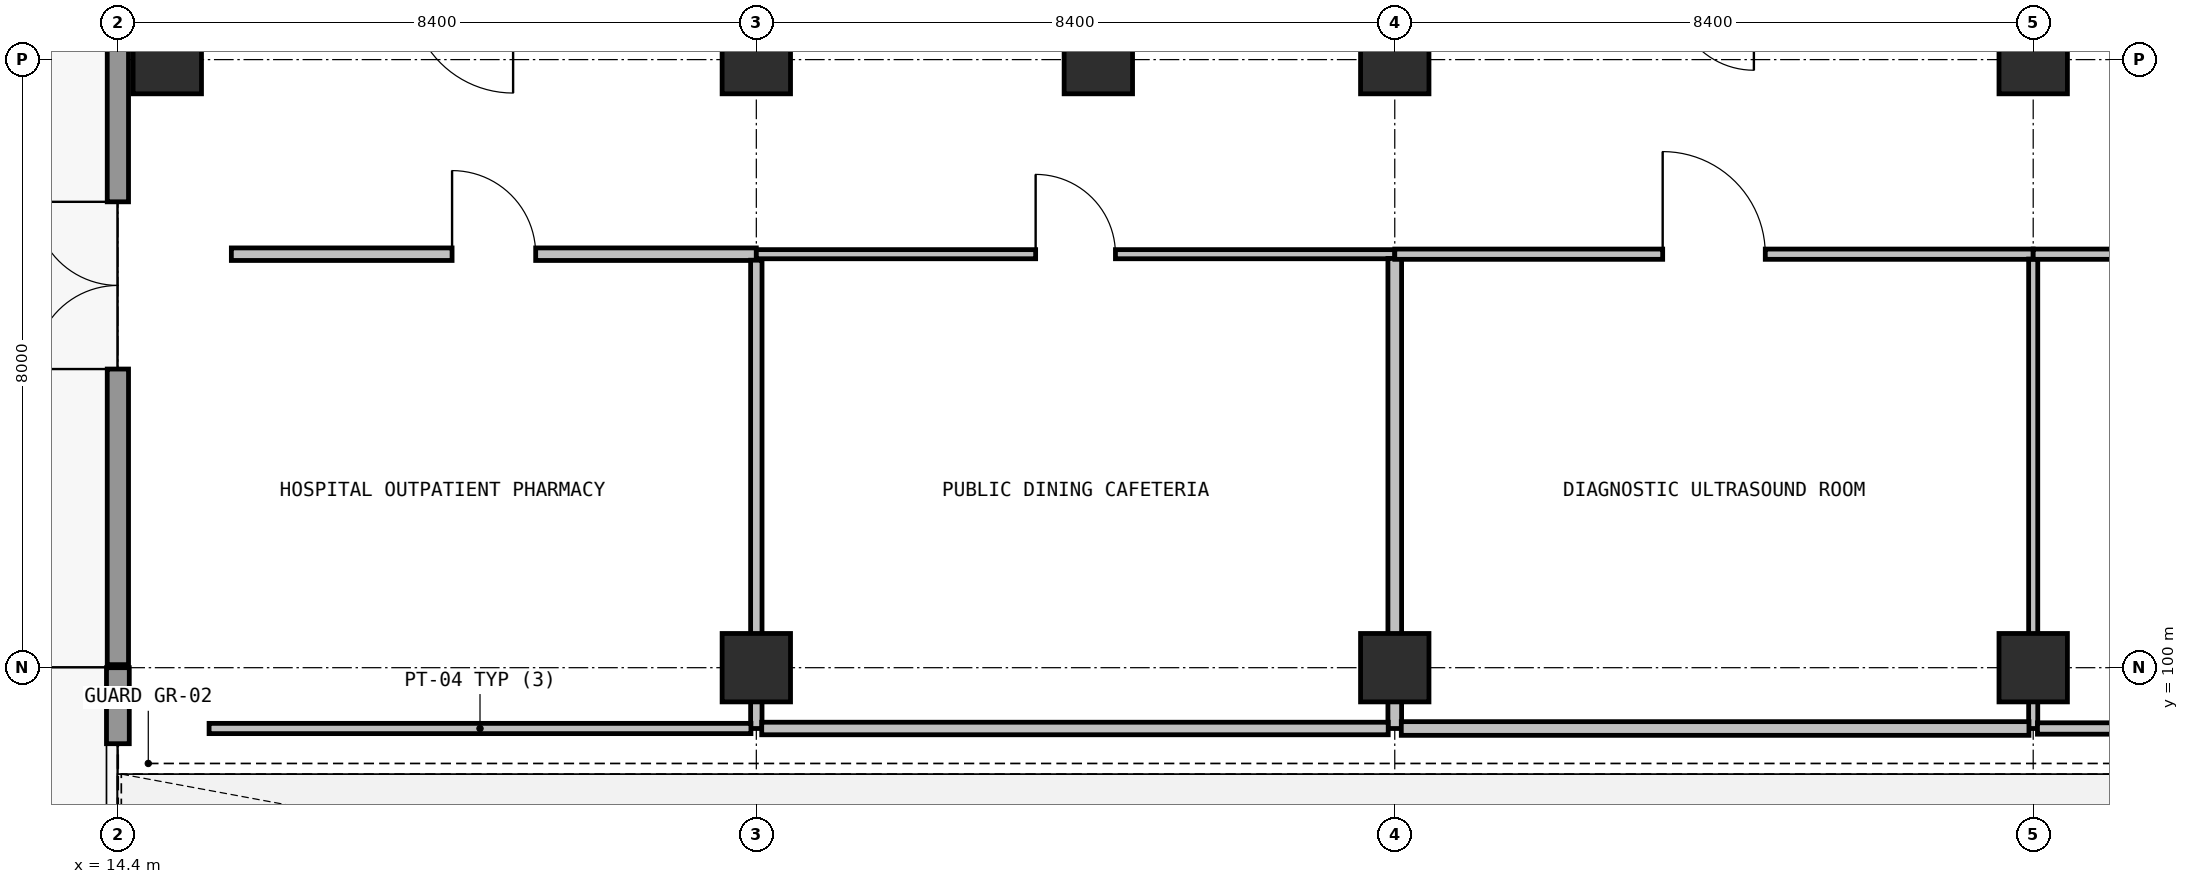
"""IFC4 building model, lengths in metres.
Left out: names, types, materials, properties, quantities, classifications, styles, units other than length and angle.
Written with IfcOpenShell. Run it as: python <this file> out.ifc"""

import sys

from ifc_helpers import new_model, si_unit, direction, frame, frame_2d, origin, origin_2d, place, context, subcontext, project, spatial, rectangle, extrude, element, fill, save


model = new_model("IFC4")
c1 = context("Model", 3, precision=1e-05, world=origin(), true_north=direction((0.0, 1.0)))
c2 = subcontext(c1, "Body", "Model", "MODEL_VIEW")
j1 = project(units=[si_unit("LENGTHUNIT", "METRE"), si_unit("PLANEANGLEUNIT", "RADIAN")], contexts=[c1])
p1 = place(None, origin())
s1 = spatial("IfcSite", under=j1, at=p1, CompositionType="ELEMENT")
p2 = place(p1, origin())
s2 = spatial("IfcBuilding", under=s1, at=p2, CompositionType="ELEMENT")
p3 = place(p2, origin())
s3 = spatial("IfcBuildingStorey", under=s2, at=p3, CompositionType="ELEMENT", Elevation=0.0)
for number, where, z_axis, x_axis in (
    (1, (27.3, 108.0, 0.0), (0.0, 0.0, 1.0), (1.0, 0.0, 0.0)),
    (2, (15.05, 108.0, 0.0), (0.0, 0.0, 1.0), (1.0, 0.0, 0.0)),
    (3, (22.8, 100.0, 0.0), (0.0, 0.0, 1.0), (1.0, 0.0, 0.0)),
    (4, (22.8, 108.0, 0.0), (0.0, 0.0, 1.0), (1.0, 0.0, 0.0)),
    (5, (31.2, 100.0, 0.0), (0.0, 0.0, 1.0), (1.0, 0.0, 0.0)),
    (6, (31.2, 108.0, 0.0), (0.0, 0.0, 1.0), (1.0, 0.0, 0.0)),
    (7, (39.6, 100.0, 0.0), (0.0, 0.0, 1.0), (1.0, 0.0, 0.0)),
    (8, (39.6, 108.0, 0.0), (0.0, 0.0, 1.0), (1.0, 0.0, 0.0)),
):
    element("IfcColumn", number, at=place(p3, frame(where, z_axis=z_axis, x_axis=x_axis)), inside=s3, PredefinedType="COLUMN", context=c2, shape_type="SweptSolid", body=[
        extrude(rectangle(XDim=0.9, YDim=0.9, at=origin_2d()), origin(), (0.0, 0.0, 1.0), 5.4),
    ])
p4 = place(p3, frame((14.4, 100.04, 0.0), z_axis=(0.0, 0.0, 1.0), x_axis=(0.0, 1.0, 0.0)))
e9 = element("IfcWall", 9, at=p4, inside=s3, PredefinedType="SOLIDWALL", context=c2, shape_type="SweptSolid", body=[
    extrude(rectangle(XDim=9.979, YDim=0.28, at=frame_2d((4.99, 0.0))), origin(), (0.0, 0.0, 1.0), 5.08),
])
p5 = place(p4, frame((3.889, 0.0, 0.0)))
e10 = element("IfcOpeningElement", 10, at=p5, cuts=e9, PredefinedType="OPENING", context=c2, shape_type="SweptSolid", body=[
    extrude(rectangle(XDim=2.2, YDim=2.35, at=frame_2d((1.1, 1.175))), frame((0.0, 0.15, 0.0), z_axis=(0.0, -1.0, 0.0), x_axis=(1.0, 0.0, 0.0)), (0.0, 0.0, 1.0), 0.3),
])
p6 = place(p3, frame((14.4, 92.0, 0.0), z_axis=(0.0, 0.0, 1.0), x_axis=(0.0, 1.0, 0.0)))
e11 = element("IfcWall", 11, at=p6, inside=s3, PredefinedType="SOLIDWALL", context=c2, shape_type="SweptSolid", body=[
    extrude(rectangle(XDim=8.0, YDim=0.3, at=frame_2d((4.0, 0.0))), origin(), (0.0, 0.0, 1.0), 5.08),
])
p7 = place(p6, frame((1.0, 0.0, 0.0)))
e12 = element("IfcOpeningElement", 12, at=p7, cuts=e11, PredefinedType="OPENING", context=c2, shape_type="SweptSolid", body=[
    extrude(rectangle(XDim=6.0, YDim=3.2, at=frame_2d((3.0, 1.6))), frame((0.0, 0.16, 0.0), z_axis=(0.0, -1.0, 0.0), x_axis=(1.0, 0.0, 0.0)), (0.0, 0.0, 1.0), 0.32),
])
p8 = place(p3, frame((15.893, 105.44, 0.0), z_axis=(0.0, 0.0, 1.0), x_axis=(1.0, 0.0, 0.0)))
e13 = element("IfcWall", 13, at=p8, inside=s3, PredefinedType="PARTITIONING", context=c2, shape_type="SweptSolid", body=[
    extrude(rectangle(XDim=6.907, YDim=0.165, at=frame_2d((3.454, 0.0))), origin(), (0.0, 0.0, 1.0), 5.08),
])
p9 = place(p8, frame((2.904, 0.0, 0.0)))
e14 = element("IfcOpeningElement", 14, at=p9, cuts=e13, PredefinedType="OPENING", context=c2, shape_type="SweptSolid", body=[
    extrude(rectangle(XDim=1.1, YDim=2.15, at=frame_2d((0.55, 1.075))), frame((0.0, 0.093, 0.0), z_axis=(0.0, -1.0, 0.0), x_axis=(1.0, 0.0, 0.0)), (0.0, 0.0, 1.0), 0.185),
])
p10 = place(p3, frame((22.8, 105.361, 0.0), z_axis=(0.0, 0.0, 1.0), x_axis=(0.0, -1.0, 0.0)))
e15 = element("IfcWall", 15, at=p10, inside=s3, PredefinedType="PARTITIONING", context=c2, shape_type="SweptSolid", body=[
    extrude(rectangle(XDim=6.161, YDim=0.15, at=frame_2d((3.081, 0.0))), origin(), (0.0, 0.0, 1.0), 4.33),
])
p11 = place(p3, frame((22.729, 99.2, 0.0), z_axis=(0.0, 0.0, 1.0), x_axis=(-1.0, 0.0, 0.0)))
e16 = element("IfcWall", 16, at=p11, inside=s3, PredefinedType="PARTITIONING", context=c2, shape_type="SweptSolid", body=[
    extrude(rectangle(XDim=7.129, YDim=0.135, at=frame_2d((3.564, 0.0))), origin(), (0.0, 0.0, 1.0), 5.08),
])
p12 = place(p3, frame((22.8, 105.44, 0.0), z_axis=(0.0, 0.0, 1.0), x_axis=(1.0, 0.0, 0.0)))
e17 = element("IfcWall", 17, at=p12, inside=s3, PredefinedType="PARTITIONING", context=c2, shape_type="SweptSolid", body=[
    extrude(rectangle(XDim=8.4, YDim=0.12, at=frame_2d((4.2, 0.0))), origin(), (0.0, 0.0, 1.0), 5.08),
])
p13 = place(p12, frame((3.675, 0.0, 0.0)))
e18 = element("IfcOpeningElement", 18, at=p13, cuts=e17, PredefinedType="OPENING", context=c2, shape_type="SweptSolid", body=[
    extrude(rectangle(XDim=1.05, YDim=2.15, at=frame_2d((0.525, 1.075))), frame((0.0, 0.07, 0.0), z_axis=(0.0, -1.0, 0.0), x_axis=(1.0, 0.0, 0.0)), (0.0, 0.0, 1.0), 0.14),
])
p14 = place(p3, frame((31.2, 105.384, 0.0), z_axis=(0.0, 0.0, 1.0), x_axis=(0.0, -1.0, 0.0)))
e19 = element("IfcWall", 19, at=p14, inside=s3, PredefinedType="PARTITIONING", context=c2, shape_type="SweptSolid", body=[
    extrude(rectangle(XDim=6.184, YDim=0.18, at=frame_2d((3.092, 0.0))), origin(), (0.0, 0.0, 1.0), 4.33),
])
p15 = place(p3, frame((31.114, 99.2, 0.0), z_axis=(0.0, 0.0, 1.0), x_axis=(-1.0, 0.0, 0.0)))
e20 = element("IfcWall", 20, at=p15, inside=s3, PredefinedType="PARTITIONING", context=c2, shape_type="SweptSolid", body=[
    extrude(rectangle(XDim=8.243, YDim=0.165, at=frame_2d((4.122, 0.0))), origin(), (0.0, 0.0, 1.0), 5.08),
])
p16 = place(p3, frame((31.2, 105.44, 0.0), z_axis=(0.0, 0.0, 1.0), x_axis=(1.0, 0.0, 0.0)))
e21 = element("IfcWall", 21, at=p16, inside=s3, PredefinedType="PARTITIONING", context=c2, shape_type="SweptSolid", body=[
    extrude(rectangle(XDim=8.4, YDim=0.135, at=frame_2d((4.2, 0.0))), origin(), (0.0, 0.0, 1.0), 5.08),
])
p17 = place(p16, frame((3.525, 0.0, 0.0)))
e22 = element("IfcOpeningElement", 22, at=p17, cuts=e21, PredefinedType="OPENING", context=c2, shape_type="SweptSolid", body=[
    extrude(rectangle(XDim=1.35, YDim=2.15, at=frame_2d((0.675, 1.075))), frame((0.0, 0.077, 0.0), z_axis=(0.0, -1.0, 0.0), x_axis=(1.0, 0.0, 0.0)), (0.0, 0.0, 1.0), 0.155),
])
p18 = place(p3, frame((39.6, 105.376, 0.0), z_axis=(0.0, 0.0, 1.0), x_axis=(0.0, -1.0, 0.0)))
e23 = element("IfcWall", 23, at=p18, inside=s3, PredefinedType="PARTITIONING", context=c2, shape_type="SweptSolid", body=[
    extrude(rectangle(XDim=6.176, YDim=0.12, at=frame_2d((3.088, 0.0))), origin(), (0.0, 0.0, 1.0), 4.33),
])
p19 = place(p3, frame((39.544, 99.2, 0.0), z_axis=(0.0, 0.0, 1.0), x_axis=(-1.0, 0.0, 0.0)))
e24 = element("IfcWall", 24, at=p19, inside=s3, PredefinedType="PARTITIONING", context=c2, shape_type="SweptSolid", body=[
    extrude(rectangle(XDim=8.258, YDim=0.18, at=frame_2d((4.129, 0.0))), origin(), (0.0, 0.0, 1.0), 5.08),
])
p20 = place(p3, frame((53.322, 99.2, 0.0), z_axis=(0.0, 0.0, 1.0), x_axis=(-1.0, 0.0, 0.0)))
e25 = element("IfcWall", 25, at=p20, inside=s3, PredefinedType="PARTITIONING", context=c2, shape_type="SweptSolid", body=[
    extrude(rectangle(XDim=13.666, YDim=0.15, at=frame_2d((6.833, 0.0))), origin(), (0.0, 0.0, 1.0), 5.08),
])
p21 = place(p3, frame((39.6, 105.44, 0.0), z_axis=(0.0, 0.0, 1.0), x_axis=(1.0, 0.0, 0.0)))
e26 = element("IfcWall", 26, at=p21, inside=s3, PredefinedType="PARTITIONING", context=c2, shape_type="SweptSolid", body=[
    extrude(rectangle(XDim=6.915, YDim=0.135, at=frame_2d((3.458, 0.0))), origin(), (0.0, 0.0, 1.0), 5.08),
])
p22 = place(p5, origin())
e27 = element("IfcDoor", 27, at=p22, inside=s3, OperationType="DOUBLE_DOOR_SINGLE_SWING", PredefinedType="DOOR", context=c2, shape_type="SweptSolid", body=[
    extrude(rectangle(XDim=2.2, YDim=2.35, at=frame_2d((1.1, 1.175))), frame((0.0, 0.025, 0.0), z_axis=(0.0, -1.0, 0.0), x_axis=(1.0, 0.0, 0.0)), (0.0, 0.0, 1.0), 0.05),
])
fill(e10, e27)
p23 = place(p7, origin())
e28 = element("IfcDoor", 28, at=p23, inside=s3, OperationType="ROLLINGUP", PredefinedType="DOOR", context=c2, shape_type="SweptSolid", body=[
    extrude(rectangle(XDim=6.0, YDim=3.2, at=frame_2d((3.0, 1.6))), frame((0.0, 0.025, 0.0), z_axis=(0.0, -1.0, 0.0), x_axis=(1.0, 0.0, 0.0)), (0.0, 0.0, 1.0), 0.05),
])
fill(e12, e28)
p24 = place(p9, origin())
e29 = element("IfcDoor", 29, at=p24, inside=s3, OperationType="SINGLE_SWING_LEFT", PredefinedType="DOOR", context=c2, shape_type="SweptSolid", body=[
    extrude(rectangle(XDim=1.1, YDim=2.15, at=frame_2d((0.55, 1.075))), frame((0.0, 0.025, 0.0), z_axis=(0.0, -1.0, 0.0), x_axis=(1.0, 0.0, 0.0)), (0.0, 0.0, 1.0), 0.05),
])
fill(e14, e29)
p25 = place(p13, origin())
e30 = element("IfcDoor", 30, at=p25, inside=s3, OperationType="SINGLE_SWING_RIGHT", PredefinedType="DOOR", context=c2, shape_type="SweptSolid", body=[
    extrude(rectangle(XDim=1.05, YDim=2.15, at=frame_2d((0.525, 1.075))), frame((0.0, 0.025, 0.0), z_axis=(0.0, -1.0, 0.0), x_axis=(1.0, 0.0, 0.0)), (0.0, 0.0, 1.0), 0.05),
])
fill(e18, e30)
p26 = place(p17, origin())
e31 = element("IfcDoor", 31, at=p26, inside=s3, OperationType="SINGLE_SWING_LEFT", PredefinedType="DOOR", context=c2, shape_type="SweptSolid", body=[
    extrude(rectangle(XDim=1.35, YDim=2.15, at=frame_2d((0.675, 1.075))), frame((0.0, 0.025, 0.0), z_axis=(0.0, -1.0, 0.0), x_axis=(1.0, 0.0, 0.0)), (0.0, 0.0, 1.0), 0.05),
])
fill(e22, e31)
save(model, sys.argv[1])
